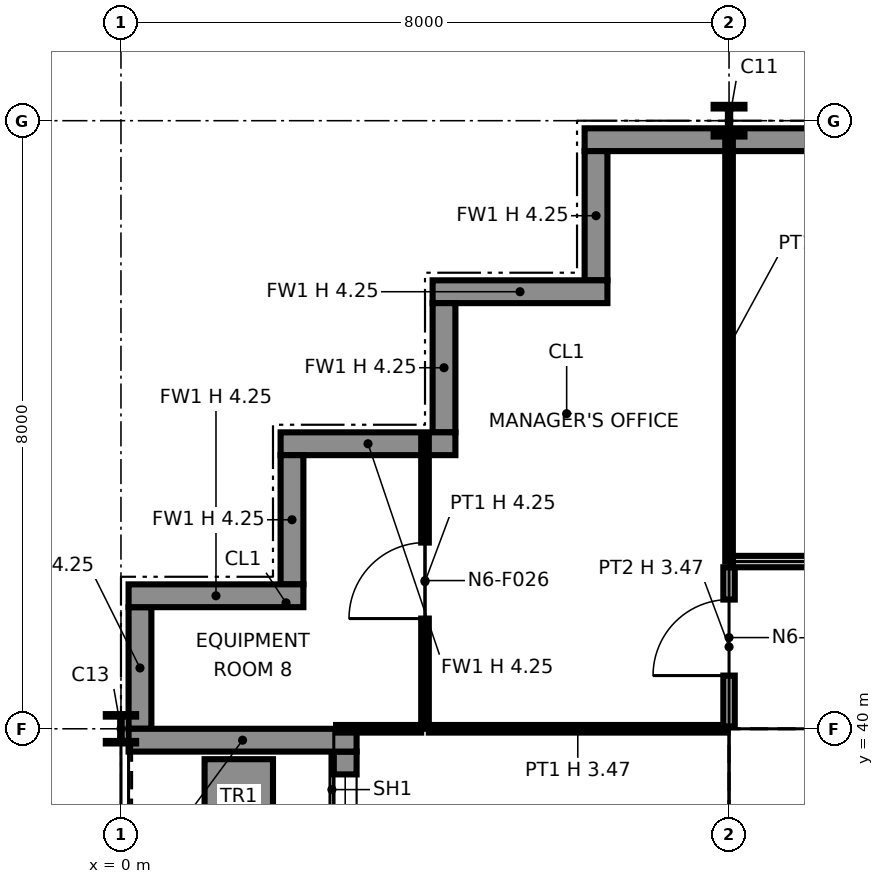
"""IFC4 building model, lengths in metres.
Left out: names, types, materials, properties, quantities, classifications, styles, units other than length and angle.
Written with IfcOpenShell. Run it as: python <this file> out.ifc"""

import sys

from ifc_helpers import new_model, si_unit, direction, frame, frame_2d, origin, origin_2d, place, context, subcontext, project, spatial, polyline, rectangle, i_section, outline, extrude, element, fill, save


model = new_model("IFC4")
c1 = context("Model", 3, precision=1e-05, world=origin(), true_north=direction((0.0, 1.0)))
c2 = subcontext(c1, "Body", "Model", "MODEL_VIEW")
j1 = project(units=[si_unit("LENGTHUNIT", "METRE"), si_unit("PLANEANGLEUNIT", "RADIAN")], contexts=[c1])
p1 = place(None, origin())
s1 = spatial("IfcSite", under=j1, at=p1, CompositionType="ELEMENT")
p2 = place(p1, origin())
s2 = spatial("IfcBuilding", under=s1, at=p2, CompositionType="ELEMENT")
p3 = place(p2, frame((0.0, 0.0, 100.8)))
s3 = spatial("IfcBuildingStorey", under=s2, at=p3, CompositionType="ELEMENT", Elevation=100.8)
p4 = place(p3, frame((0.0, 40.0, 0.0), z_axis=(0.0, 0.0, 1.0), x_axis=(1.0, 0.0, 0.0)))
e1 = element("IfcColumn", 1, at=p4, inside=s3, PredefinedType="COLUMN", context=c2, shape_type="SweptSolid", body=[
    extrude(i_section(OverallWidth=0.399, OverallDepth=0.386, WebThickness=0.021, FlangeThickness=0.033, at=origin_2d()), origin(), (0.0, 0.0, 1.0), 4.25),
])
p5 = place(p3, frame((8.0, 40.0, 0.0), z_axis=(0.0, 0.0, 1.0), x_axis=(1.0, 0.0, 0.0)))
e2 = element("IfcColumn", 2, at=p5, inside=s3, PredefinedType="COLUMN", context=c2, shape_type="SweptSolid", body=[
    extrude(i_section(OverallWidth=0.373, OverallDepth=0.368, WebThickness=0.015, FlangeThickness=0.024, at=origin_2d()), origin(), (0.0, 0.0, 1.0), 4.25),
])
p6 = place(p3, frame((8.0, 48.0, 0.0), z_axis=(0.0, 0.0, 1.0), x_axis=(1.0, 0.0, 0.0)))
e3 = element("IfcColumn", 3, at=p6, inside=s3, PredefinedType="COLUMN", context=c2, shape_type="SweptSolid", body=[
    extrude(i_section(OverallWidth=0.406, OverallDepth=0.417, WebThickness=0.03, FlangeThickness=0.048, at=origin_2d()), origin(), (0.0, 0.0, 1.0), 4.25),
])
p7 = place(p3, frame((0.25, 41.6, 0.0), z_axis=(0.0, 0.0, 1.0), x_axis=(0.0, -1.0, 0.0)))
e4 = element("IfcWall", 4, at=p7, inside=s3, PredefinedType="SOLIDWALL", context=c2, shape_type="SweptSolid", body=[
    extrude(rectangle(XDim=1.6, YDim=0.3, at=frame_2d((0.8, 0.0))), origin(), (0.0, 0.0, 1.0), 4.25),
])
p8 = place(p3, frame((2.95, 39.7, 0.0), z_axis=(0.0, 0.0, 1.0), x_axis=(0.0, -1.0, 0.0)))
e5 = element("IfcWall", 5, at=p8, inside=s3, PredefinedType="SOLIDWALL", context=c2, shape_type="SweptSolid", body=[
    extrude(rectangle(XDim=7.4, YDim=0.3, at=frame_2d((3.7, 0.0))), origin(), (0.0, 0.0, 1.0), 4.25),
])
p9 = place(p8, frame((0.3, 0.0, 0.9)))
e6 = element("IfcOpeningElement", 6, at=p9, cuts=e5, PredefinedType="OPENING", context=c2, shape_type="SweptSolid", body=[
    extrude(rectangle(XDim=2.8, YDim=2.2, at=frame_2d((1.4, 1.1))), frame((0.0, 0.16, 0.0), z_axis=(0.0, -1.0, 0.0), x_axis=(1.0, 0.0, 0.0)), (0.0, 0.0, 1.0), 0.32),
])
p10 = place(p8, frame((4.7, 0.0, 0.0)))
e7 = element("IfcOpeningElement", 7, at=p10, cuts=e5, PredefinedType="OPENING", context=c2, shape_type="SweptSolid", body=[
    extrude(rectangle(XDim=2.0, YDim=2.4, at=frame_2d((1.0, 1.2))), frame((0.0, 0.16, 0.0), z_axis=(0.0, -1.0, 0.0), x_axis=(1.0, 0.0, 0.0)), (0.0, 0.0, 1.0), 0.32),
])
p11 = place(p3, frame((0.1, 39.85, 0.0), z_axis=(0.0, 0.0, 1.0), x_axis=(1.0, 0.0, 0.0)))
e8 = element("IfcWall", 8, at=p11, inside=s3, PredefinedType="SOLIDWALL", context=c2, shape_type="SweptSolid", body=[
    extrude(rectangle(XDim=3.0, YDim=0.3, at=frame_2d((1.5, 0.0))), origin(), (0.0, 0.0, 1.0), 3.469),
])
p12 = place(p3, frame((1.55, 39.6, 0.0), z_axis=(0.0, 0.0, 1.0), x_axis=(0.0, -1.0, 0.0)))
e9 = element("IfcWall", 9, at=p12, inside=s3, PredefinedType="SOLIDWALL", context=c2, shape_type="SweptSolid", body=[
    extrude(rectangle(XDim=3.2, YDim=0.9, at=frame_2d((1.6, 0.0))), origin(), (0.0, 0.0, 1.0), 0.6),
])
p13 = place(p3, frame((16.0, 47.75, 0.0), z_axis=(0.0, 0.0, 1.0), x_axis=(-1.0, 0.0, 0.0)))
e10 = element("IfcWall", 10, at=p13, inside=s3, PredefinedType="SOLIDWALL", context=c2, shape_type="SweptSolid", body=[
    extrude(rectangle(XDim=9.9, YDim=0.3, at=frame_2d((4.95, 0.0))), origin(), (0.0, 0.0, 1.0), 4.25),
])
p14 = place(p3, frame((6.25, 47.6, 0.0), z_axis=(0.0, 0.0, 1.0), x_axis=(0.0, -1.0, 0.0)))
e11 = element("IfcWall", 11, at=p14, inside=s3, PredefinedType="SOLIDWALL", context=c2, shape_type="SweptSolid", body=[
    extrude(rectangle(XDim=1.7, YDim=0.3, at=frame_2d((0.85, 0.0))), origin(), (0.0, 0.0, 1.0), 4.25),
])
p15 = place(p3, frame((6.4, 45.75, 0.0), z_axis=(0.0, 0.0, 1.0), x_axis=(-1.0, 0.0, 0.0)))
e12 = element("IfcWall", 12, at=p15, inside=s3, PredefinedType="SOLIDWALL", context=c2, shape_type="SweptSolid", body=[
    extrude(rectangle(XDim=2.3, YDim=0.3, at=frame_2d((1.15, 0.0))), origin(), (0.0, 0.0, 1.0), 4.25),
])
p16 = place(p3, frame((4.25, 45.6, 0.0), z_axis=(0.0, 0.0, 1.0), x_axis=(0.0, -1.0, 0.0)))
e13 = element("IfcWall", 13, at=p16, inside=s3, PredefinedType="SOLIDWALL", context=c2, shape_type="SweptSolid", body=[
    extrude(rectangle(XDim=1.7, YDim=0.3, at=frame_2d((0.85, 0.0))), origin(), (0.0, 0.0, 1.0), 4.25),
])
p17 = place(p3, frame((4.4, 43.75, 0.0), z_axis=(0.0, 0.0, 1.0), x_axis=(-1.0, 0.0, 0.0)))
e14 = element("IfcWall", 14, at=p17, inside=s3, PredefinedType="SOLIDWALL", context=c2, shape_type="SweptSolid", body=[
    extrude(rectangle(XDim=2.3, YDim=0.3, at=frame_2d((1.15, 0.0))), origin(), (0.0, 0.0, 1.0), 4.25),
])
p18 = place(p3, frame((2.25, 43.6, 0.0), z_axis=(0.0, 0.0, 1.0), x_axis=(0.0, -1.0, 0.0)))
e15 = element("IfcWall", 15, at=p18, inside=s3, PredefinedType="SOLIDWALL", context=c2, shape_type="SweptSolid", body=[
    extrude(rectangle(XDim=1.7, YDim=0.3, at=frame_2d((0.85, 0.0))), origin(), (0.0, 0.0, 1.0), 4.25),
])
p19 = place(p3, frame((2.4, 41.75, 0.0), z_axis=(0.0, 0.0, 1.0), x_axis=(-1.0, 0.0, 0.0)))
e16 = element("IfcWall", 16, at=p19, inside=s3, PredefinedType="SOLIDWALL", context=c2, shape_type="SweptSolid", body=[
    extrude(rectangle(XDim=2.3, YDim=0.3, at=frame_2d((1.15, 0.0))), origin(), (0.0, 0.0, 1.0), 4.25),
])
p20 = place(p3, frame((8.75, 32.85, 0.0), z_axis=(0.0, 0.0, 1.0), x_axis=(0.0, 1.0, 0.0)))
e17 = element("IfcWall", 17, at=p20, inside=s3, PredefinedType="PARTITIONING", context=c2, shape_type="SweptSolid", body=[
    extrude(outline(polyline([(0.0, 0.0), (6.3, 0.0), (6.3, 4.25), (3.231, 4.25), (3.23, 3.789), (3.07, 3.789), (3.069, 4.25), (0.0, 4.25), (0.0, 0.0)])), frame((0.0, 0.1, 0.0), z_axis=(0.0, -1.0, 0.0), x_axis=(1.0, 0.0, 0.0)), (0.0, 0.0, 1.0), 0.2),
])
p21 = place(p3, frame((8.65, 39.25, 0.0), z_axis=(0.0, 0.0, 1.0), x_axis=(1.0, 0.0, 0.0)))
e18 = element("IfcWall", 18, at=p21, inside=s3, PredefinedType="PARTITIONING", context=c2, shape_type="SweptSolid", body=[
    extrude(outline(polyline([(0.0, 0.0), (14.7, 0.0), (14.7, 4.25), (7.469, 4.25), (7.469, 3.632), (7.231, 3.632), (7.23, 4.25), (0.0, 4.25), (0.0, 0.0)])), frame((0.0, 0.1, 0.0), z_axis=(0.0, -1.0, 0.0), x_axis=(1.0, 0.0, 0.0)), (0.0, 0.0, 1.0), 0.2),
])
p22 = place(p3, frame((2.83, 40.0, 0.0), z_axis=(0.0, 0.0, 1.0), x_axis=(1.0, 0.0, 0.0)))
e19 = element("IfcWall", 19, at=p22, inside=s3, PredefinedType="PARTITIONING", context=c2, shape_type="SweptSolid", body=[
    extrude(rectangle(XDim=1.12, YDim=0.1, at=frame_2d((0.56, 0.0))), origin(), (0.0, 0.0, 1.0), 3.47),
])
p23 = place(p3, frame((4.05, 40.0, 0.0), z_axis=(0.0, 0.0, 1.0), x_axis=(1.0, 0.0, 0.0)))
e20 = element("IfcWall", 20, at=p23, inside=s3, PredefinedType="PARTITIONING", context=c2, shape_type="SweptSolid", body=[
    extrude(rectangle(XDim=3.92, YDim=0.1, at=frame_2d((1.96, 0.0))), origin(), (0.0, 0.0, 1.0), 3.47),
])
p24 = place(p3, frame((4.0, 40.0, 0.0), z_axis=(0.0, 0.0, 1.0), x_axis=(0.0, 1.0, 0.0)))
e21 = element("IfcWall", 21, at=p24, inside=s3, PredefinedType="PARTITIONING", context=c2, shape_type="SweptSolid", body=[
    extrude(rectangle(XDim=3.87, YDim=0.1, at=frame_2d((1.935, 0.0))), origin(), (0.0, 0.0, 1.0), 4.25),
])
p25 = place(p24, frame((1.45, 0.0, 0.0)))
e22 = element("IfcOpeningElement", 22, at=p25, cuts=e21, PredefinedType="OPENING", context=c2, shape_type="SweptSolid", body=[
    extrude(rectangle(XDim=1.0, YDim=2.1, at=frame_2d((0.5, 1.05))), frame((0.0, 0.06, 0.0), z_axis=(0.0, -1.0, 0.0), x_axis=(1.0, 0.0, 0.0)), (0.0, 0.0, 1.0), 0.12),
])
p26 = place(p3, frame((8.0, 40.03, 0.0), z_axis=(0.0, 0.0, 1.0), x_axis=(0.0, 1.0, 0.0)))
e23 = element("IfcWall", 23, at=p26, inside=s3, PredefinedType="PARTITIONING", context=c2, shape_type="SweptSolid", body=[
    extrude(rectangle(XDim=2.095, YDim=0.15, at=frame_2d((1.047, 0.0))), origin(), (0.0, 0.0, 1.0), 3.47),
])
p27 = place(p26, frame((0.67, 0.0, 0.0)))
e24 = element("IfcOpeningElement", 24, at=p27, cuts=e23, PredefinedType="OPENING", context=c2, shape_type="SweptSolid", body=[
    extrude(rectangle(XDim=1.0, YDim=2.1, at=frame_2d((0.5, 1.05))), frame((0.0, 0.085, 0.0), z_axis=(0.0, -1.0, 0.0), x_axis=(1.0, 0.0, 0.0)), (0.0, 0.0, 1.0), 0.17),
])
p28 = place(p3, frame((8.05, 42.2, 0.0), z_axis=(0.0, 0.0, 1.0), x_axis=(1.0, 0.0, 0.0)))
e25 = element("IfcWall", 25, at=p28, inside=s3, PredefinedType="PARTITIONING", context=c2, shape_type="SweptSolid", body=[
    extrude(rectangle(XDim=34.15, YDim=0.15, at=frame_2d((17.075, 0.0))), origin(), (0.0, 0.0, 1.0), 4.25),
])
p29 = place(p28, frame((11.45, 0.0, 0.0)))
e26 = element("IfcOpeningElement", 26, at=p29, cuts=e25, PredefinedType="OPENING", context=c2, shape_type="SweptSolid", body=[
    extrude(rectangle(XDim=1.0, YDim=2.1, at=frame_2d((0.5, 1.05))), frame((0.0, 0.085, 0.0), z_axis=(0.0, -1.0, 0.0), x_axis=(1.0, 0.0, 0.0)), (0.0, 0.0, 1.0), 0.17),
])
p30 = place(p28, frame((27.45, 0.0, 0.0)))
e27 = element("IfcOpeningElement", 27, at=p30, cuts=e25, PredefinedType="OPENING", context=c2, shape_type="SweptSolid", body=[
    extrude(rectangle(XDim=1.0, YDim=2.1, at=frame_2d((0.5, 1.05))), frame((0.0, 0.085, 0.0), z_axis=(0.0, -1.0, 0.0), x_axis=(1.0, 0.0, 0.0)), (0.0, 0.0, 1.0), 0.17),
])
p31 = place(p28, frame((1.45, 0.0, 0.0)))
e28 = element("IfcOpeningElement", 28, at=p31, cuts=e25, PredefinedType="OPENING", context=c2, shape_type="SweptSolid", body=[
    extrude(rectangle(XDim=1.0, YDim=2.1, at=frame_2d((0.5, 1.05))), frame((0.0, 0.085, 0.0), z_axis=(0.0, -1.0, 0.0), x_axis=(1.0, 0.0, 0.0)), (0.0, 0.0, 1.0), 0.17),
])
p32 = place(p28, frame((5.45, 0.0, 0.0)))
e29 = element("IfcOpeningElement", 29, at=p32, cuts=e25, PredefinedType="OPENING", context=c2, shape_type="SweptSolid", body=[
    extrude(rectangle(XDim=1.0, YDim=2.1, at=frame_2d((0.5, 1.05))), frame((0.0, 0.085, 0.0), z_axis=(0.0, -1.0, 0.0), x_axis=(1.0, 0.0, 0.0)), (0.0, 0.0, 1.0), 0.17),
])
p33 = place(p28, frame((17.45, 0.0, 0.0)))
e30 = element("IfcOpeningElement", 30, at=p33, cuts=e25, PredefinedType="OPENING", context=c2, shape_type="SweptSolid", body=[
    extrude(rectangle(XDim=1.0, YDim=2.1, at=frame_2d((0.5, 1.05))), frame((0.0, 0.085, 0.0), z_axis=(0.0, -1.0, 0.0), x_axis=(1.0, 0.0, 0.0)), (0.0, 0.0, 1.0), 0.17),
])
p34 = place(p28, frame((21.45, 0.0, 0.0)))
e31 = element("IfcOpeningElement", 31, at=p34, cuts=e25, PredefinedType="OPENING", context=c2, shape_type="SweptSolid", body=[
    extrude(rectangle(XDim=1.0, YDim=2.1, at=frame_2d((0.5, 1.05))), frame((0.0, 0.085, 0.0), z_axis=(0.0, -1.0, 0.0), x_axis=(1.0, 0.0, 0.0)), (0.0, 0.0, 1.0), 0.17),
])
p35 = place(p3, frame((8.0, 42.2, 0.0), z_axis=(0.0, 0.0, 1.0), x_axis=(0.0, 1.0, 0.0)))
e32 = element("IfcWall", 32, at=p35, inside=s3, PredefinedType="PARTITIONING", context=c2, shape_type="SweptSolid", body=[
    extrude(rectangle(XDim=5.67, YDim=0.1, at=frame_2d((2.835, 0.0))), origin(), (0.0, 0.0, 1.0), 3.47),
])
p36 = place(p9, origin())
e33 = element("IfcWindow", 33, at=p36, inside=s3, PartitioningType="SINGLE_PANEL", PredefinedType="WINDOW", context=c2, shape_type="SweptSolid", body=[
    extrude(rectangle(XDim=2.8, YDim=2.2, at=frame_2d((1.4, 1.1))), frame((0.0, 0.03, 0.0), z_axis=(0.0, -1.0, 0.0), x_axis=(1.0, 0.0, 0.0)), (0.0, 0.0, 1.0), 0.06),
])
fill(e6, e33)
p37 = place(p27, origin())
e34 = element("IfcDoor", 34, at=p37, inside=s3, OperationType="SINGLE_SWING_LEFT", PredefinedType="DOOR", context=c2, shape_type="SweptSolid", body=[
    extrude(rectangle(XDim=1.0, YDim=2.1, at=frame_2d((0.5, 1.05))), frame((0.0, 0.025, 0.0), z_axis=(0.0, -1.0, 0.0), x_axis=(1.0, 0.0, 0.0)), (0.0, 0.0, 1.0), 0.05),
])
fill(e24, e34)
p38 = place(p25, origin())
e35 = element("IfcDoor", 35, at=p38, inside=s3, OperationType="SINGLE_SWING_LEFT", PredefinedType="DOOR", context=c2, shape_type="SweptSolid", body=[
    extrude(rectangle(XDim=1.0, YDim=2.1, at=frame_2d((0.5, 1.05))), frame((0.0, 0.025, 0.0), z_axis=(0.0, -1.0, 0.0), x_axis=(1.0, 0.0, 0.0)), (0.0, 0.0, 1.0), 0.05),
])
fill(e22, e35)
save(model, sys.argv[1])
